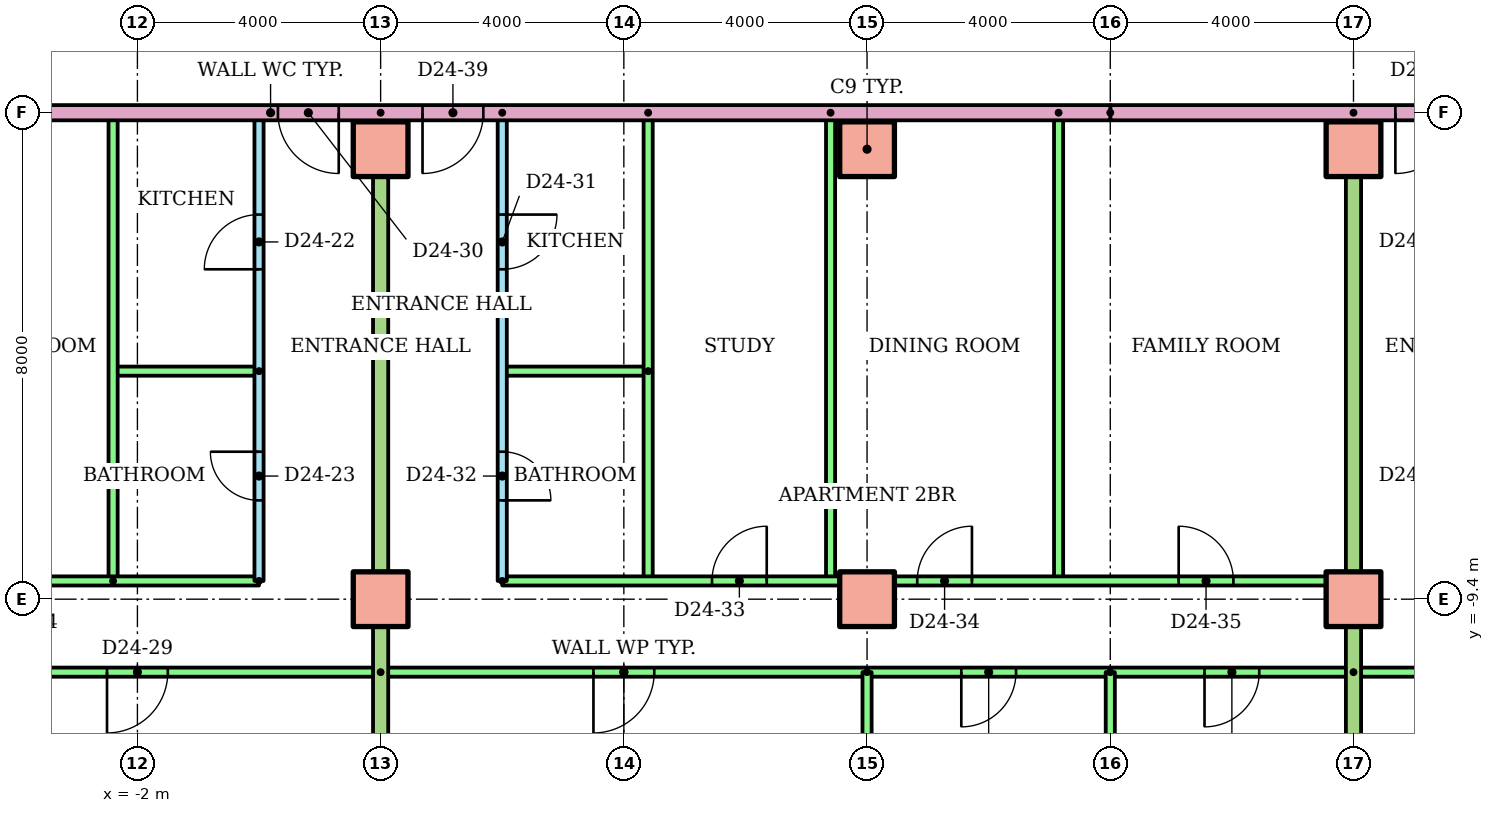
"""IFC4 building model, lengths in metres.
Left out: names, types, materials, properties, quantities, classifications, styles, units other than length and angle.
Written with IfcOpenShell. Run it as: python <this file> out.ifc"""

import sys

from ifc_helpers import new_model, si_unit, direction, frame, frame_2d, origin, origin_2d, place, context, subcontext, project, spatial, rectangle, extrude, element, fill, save


model = new_model("IFC4")
c1 = context("Model", 3, precision=1e-05, world=origin(), true_north=direction((0.0, 1.0)))
c2 = subcontext(c1, "Body", "Model", "MODEL_VIEW")
j1 = project(units=[si_unit("LENGTHUNIT", "METRE"), si_unit("PLANEANGLEUNIT", "RADIAN")], contexts=[c1])
p1 = place(None, origin())
s1 = spatial("IfcSite", under=j1, at=p1, CompositionType="ELEMENT")
p2 = place(p1, origin())
s2 = spatial("IfcBuilding", under=s1, at=p2, CompositionType="ELEMENT")
p3 = place(p2, frame((0.0, 0.0, 93.5)))
s3 = spatial("IfcBuildingStorey", under=s2, at=p3, CompositionType="ELEMENT", Elevation=93.5)
for number, where in (
    (1, (2.0, -9.4, 0.0)),
    (2, (10.0, -9.4, 0.0)),
    (3, (18.0, -9.4, 0.0)),
    (4, (2.0, -2.0, 0.0)),
    (5, (10.0, -2.0, 0.0)),
    (6, (18.0, -2.0, 0.0)),
):
    element("IfcColumn", number, at=place(p3, frame(where)), inside=s3, PredefinedType="COLUMN", context=c2, shape_type="SweptSolid", body=[
        extrude(rectangle(XDim=0.9, YDim=0.9, at=origin_2d()), origin(), (0.0, 0.0, 1.0), 3.2),
    ])
p4 = place(p3, frame((0.0, -9.1, 0.0), z_axis=(0.0, 0.0, 1.0), x_axis=(0.0, 1.0, 0.0)))
e7 = element("IfcWall", 7, at=p4, inside=s3, PredefinedType="PARTITIONING", context=c2, shape_type="SweptSolid", body=[
    extrude(rectangle(XDim=7.7, YDim=0.15, at=frame_2d((3.85, 0.0))), origin(), (0.0, 0.0, 1.0), 2.4),
])
p5 = place(p4, frame((5.125, 0.0, 0.0)))
e8 = element("IfcOpeningElement", 8, at=p5, cuts=e7, PredefinedType="OPENING", context=c2, shape_type="SweptSolid", body=[
    extrude(rectangle(XDim=0.9, YDim=2.1, at=frame_2d((0.45, 1.05))), frame((0.0, 0.085, 0.0), z_axis=(0.0, -1.0, 0.0), x_axis=(1.0, 0.0, 0.0)), (0.0, 0.0, 1.0), 0.17),
])
p6 = place(p4, frame((1.325, 0.0, 0.0)))
e9 = element("IfcOpeningElement", 9, at=p6, cuts=e7, PredefinedType="OPENING", context=c2, shape_type="SweptSolid", body=[
    extrude(rectangle(XDim=0.8, YDim=2.1, at=frame_2d((0.4, 1.05))), frame((0.0, 0.085, 0.0), z_axis=(0.0, -1.0, 0.0), x_axis=(1.0, 0.0, 0.0)), (0.0, 0.0, 1.0), 0.17),
])
p7 = place(p3, frame((0.0, -5.65, 0.0), z_axis=(0.0, 0.0, 1.0), x_axis=(-1.0, 0.0, 0.0)))
e10 = element("IfcWall", 10, at=p7, inside=s3, PredefinedType="PARTITIONING", context=c2, shape_type="SweptSolid", body=[
    extrude(rectangle(XDim=2.4, YDim=0.15, at=frame_2d((1.2, 0.0))), origin(), (0.0, 0.0, 1.0), 2.4),
])
p8 = place(p3, frame((-2.4, -9.1, 0.0), z_axis=(0.0, 0.0, 1.0), x_axis=(0.0, 1.0, 0.0)))
e11 = element("IfcWall", 11, at=p8, inside=s3, PredefinedType="PARTITIONING", context=c2, shape_type="SweptSolid", body=[
    extrude(rectangle(XDim=7.7, YDim=0.15, at=frame_2d((3.85, 0.0))), origin(), (0.0, 0.0, 1.0), 2.4),
])
p9 = place(p3, frame((-14.0, -9.1, 0.0)))
e12 = element("IfcWall", 12, at=p9, inside=s3, PredefinedType="PARTITIONING", context=c2, shape_type="SweptSolid", body=[
    extrude(rectangle(XDim=14.0, YDim=0.15, at=frame_2d((7.0, 0.0))), origin(), (0.0, 0.0, 1.0), 2.4),
])
p10 = place(p9, frame((9.65, 0.0, 0.0)))
e13 = element("IfcOpeningElement", 13, at=p10, cuts=e12, PredefinedType="OPENING", context=c2, shape_type="SweptSolid", body=[
    extrude(rectangle(XDim=0.9, YDim=2.1, at=frame_2d((0.45, 1.05))), frame((0.0, 0.085, 0.0), z_axis=(0.0, -1.0, 0.0), x_axis=(1.0, 0.0, 0.0)), (0.0, 0.0, 1.0), 0.17),
])
p11 = place(p9, frame((6.275, 0.0, 0.0)))
e14 = element("IfcOpeningElement", 14, at=p11, cuts=e12, PredefinedType="OPENING", context=c2, shape_type="SweptSolid", body=[
    extrude(rectangle(XDim=0.9, YDim=2.1, at=frame_2d((0.45, 1.05))), frame((0.0, 0.085, 0.0), z_axis=(0.0, -1.0, 0.0), x_axis=(1.0, 0.0, 0.0)), (0.0, 0.0, 1.0), 0.17),
])
p12 = place(p9, frame((1.975, 0.0, 0.0)))
e15 = element("IfcOpeningElement", 15, at=p12, cuts=e12, PredefinedType="OPENING", context=c2, shape_type="SweptSolid", body=[
    extrude(rectangle(XDim=0.9, YDim=2.1, at=frame_2d((0.45, 1.05))), frame((0.0, 0.085, 0.0), z_axis=(0.0, -1.0, 0.0), x_axis=(1.0, 0.0, 0.0)), (0.0, 0.0, 1.0), 0.17),
])
p13 = place(p3, frame((2.0, -10.6, 0.0), z_axis=(0.0, 0.0, 1.0), x_axis=(-1.0, 0.0, 0.0)))
e16 = element("IfcWall", 16, at=p13, inside=s3, PredefinedType="PARTITIONING", context=c2, shape_type="SweptSolid", body=[
    extrude(rectangle(XDim=16.0, YDim=0.15, at=frame_2d((8.0, 0.0))), origin(), (0.0, 0.0, 1.0), 2.4),
])
p14 = place(p13, frame((13.55, 0.0, 0.0)))
e17 = element("IfcOpeningElement", 17, at=p14, cuts=e16, PredefinedType="OPENING", context=c2, shape_type="SweptSolid", body=[
    extrude(rectangle(XDim=0.9, YDim=2.1, at=frame_2d((0.45, 1.05))), frame((0.0, 0.085, 0.0), z_axis=(0.0, -1.0, 0.0), x_axis=(1.0, 0.0, 0.0)), (0.0, 0.0, 1.0), 0.17),
])
p15 = place(p13, frame((9.55, 0.0, 0.0)))
e18 = element("IfcOpeningElement", 18, at=p15, cuts=e16, PredefinedType="OPENING", context=c2, shape_type="SweptSolid", body=[
    extrude(rectangle(XDim=0.9, YDim=2.1, at=frame_2d((0.45, 1.05))), frame((0.0, 0.085, 0.0), z_axis=(0.0, -1.0, 0.0), x_axis=(1.0, 0.0, 0.0)), (0.0, 0.0, 1.0), 0.17),
])
p16 = place(p13, frame((3.5, 0.0, 0.0)))
e19 = element("IfcOpeningElement", 19, at=p16, cuts=e16, PredefinedType="OPENING", context=c2, shape_type="SweptSolid", body=[
    extrude(rectangle(XDim=1.0, YDim=2.1, at=frame_2d((0.5, 1.05))), frame((0.0, 0.085, 0.0), z_axis=(0.0, -1.0, 0.0), x_axis=(1.0, 0.0, 0.0)), (0.0, 0.0, 1.0), 0.17),
])
p17 = place(p3, frame((4.0, -1.4, 0.0), z_axis=(0.0, 0.0, 1.0), x_axis=(0.0, -1.0, 0.0)))
e20 = element("IfcWall", 20, at=p17, inside=s3, PredefinedType="PARTITIONING", context=c2, shape_type="SweptSolid", body=[
    extrude(rectangle(XDim=7.7, YDim=0.15, at=frame_2d((3.85, 0.0))), origin(), (0.0, 0.0, 1.0), 2.4),
])
p18 = place(p17, frame((1.675, 0.0, 0.0)))
e21 = element("IfcOpeningElement", 21, at=p18, cuts=e20, PredefinedType="OPENING", context=c2, shape_type="SweptSolid", body=[
    extrude(rectangle(XDim=0.9, YDim=2.1, at=frame_2d((0.45, 1.05))), frame((0.0, 0.085, 0.0), z_axis=(0.0, -1.0, 0.0), x_axis=(1.0, 0.0, 0.0)), (0.0, 0.0, 1.0), 0.17),
])
p19 = place(p17, frame((5.575, 0.0, 0.0)))
e22 = element("IfcOpeningElement", 22, at=p19, cuts=e20, PredefinedType="OPENING", context=c2, shape_type="SweptSolid", body=[
    extrude(rectangle(XDim=0.8, YDim=2.1, at=frame_2d((0.4, 1.05))), frame((0.0, 0.085, 0.0), z_axis=(0.0, -1.0, 0.0), x_axis=(1.0, 0.0, 0.0)), (0.0, 0.0, 1.0), 0.17),
])
p20 = place(p3, frame((6.4, -5.65, 0.0), z_axis=(0.0, 0.0, 1.0), x_axis=(-1.0, 0.0, 0.0)))
e23 = element("IfcWall", 23, at=p20, inside=s3, PredefinedType="PARTITIONING", context=c2, shape_type="SweptSolid", body=[
    extrude(rectangle(XDim=2.4, YDim=0.15, at=frame_2d((1.2, 0.0))), origin(), (0.0, 0.0, 1.0), 2.4),
])
for number, where, z_axis, x_axis in (
    (24, (6.4, -1.4, 0.0), (0.0, 0.0, 1.0), (0.0, -1.0, 0.0)),
    (25, (9.4, -1.4, 0.0), (0.0, 0.0, 1.0), (0.0, -1.0, 0.0)),
    (26, (13.15, -1.4, 0.0), (0.0, 0.0, 1.0), (0.0, -1.0, 0.0)),
):
    element("IfcWall", number, at=place(p3, frame(where, z_axis=z_axis, x_axis=x_axis)), inside=s3, PredefinedType="PARTITIONING", context=c2, shape_type="SweptSolid", body=[
        extrude(rectangle(XDim=7.7, YDim=0.15, at=frame_2d((3.85, 0.0))), origin(), (0.0, 0.0, 1.0), 2.4),
    ])
p21 = place(p3, frame((4.0, -9.1, 0.0)))
e27 = element("IfcWall", 27, at=p21, inside=s3, PredefinedType="PARTITIONING", context=c2, shape_type="SweptSolid", body=[
    extrude(rectangle(XDim=14.0, YDim=0.15, at=frame_2d((7.0, 0.0))), origin(), (0.0, 0.0, 1.0), 2.4),
])
p22 = place(p21, frame((3.45, 0.0, 0.0)))
e28 = element("IfcOpeningElement", 28, at=p22, cuts=e27, PredefinedType="OPENING", context=c2, shape_type="SweptSolid", body=[
    extrude(rectangle(XDim=0.9, YDim=2.1, at=frame_2d((0.45, 1.05))), frame((0.0, 0.085, 0.0), z_axis=(0.0, -1.0, 0.0), x_axis=(1.0, 0.0, 0.0)), (0.0, 0.0, 1.0), 0.17),
])
p23 = place(p21, frame((6.825, 0.0, 0.0)))
e29 = element("IfcOpeningElement", 29, at=p23, cuts=e27, PredefinedType="OPENING", context=c2, shape_type="SweptSolid", body=[
    extrude(rectangle(XDim=0.9, YDim=2.1, at=frame_2d((0.45, 1.05))), frame((0.0, 0.085, 0.0), z_axis=(0.0, -1.0, 0.0), x_axis=(1.0, 0.0, 0.0)), (0.0, 0.0, 1.0), 0.17),
])
p24 = place(p21, frame((11.125, 0.0, 0.0)))
e30 = element("IfcOpeningElement", 30, at=p24, cuts=e27, PredefinedType="OPENING", context=c2, shape_type="SweptSolid", body=[
    extrude(rectangle(XDim=0.9, YDim=2.1, at=frame_2d((0.45, 1.05))), frame((0.0, 0.085, 0.0), z_axis=(0.0, -1.0, 0.0), x_axis=(1.0, 0.0, 0.0)), (0.0, 0.0, 1.0), 0.17),
])
p25 = place(p3, frame((18.0, -10.6, 0.0), z_axis=(0.0, 0.0, 1.0), x_axis=(-1.0, 0.0, 0.0)))
e31 = element("IfcWall", 31, at=p25, inside=s3, PredefinedType="PARTITIONING", context=c2, shape_type="SweptSolid", body=[
    extrude(rectangle(XDim=16.0, YDim=0.15, at=frame_2d((8.0, 0.0))), origin(), (0.0, 0.0, 1.0), 2.4),
])
p26 = place(p25, frame((11.5, 0.0, 0.0)))
e32 = element("IfcOpeningElement", 32, at=p26, cuts=e31, PredefinedType="OPENING", context=c2, shape_type="SweptSolid", body=[
    extrude(rectangle(XDim=1.0, YDim=2.1, at=frame_2d((0.5, 1.05))), frame((0.0, 0.085, 0.0), z_axis=(0.0, -1.0, 0.0), x_axis=(1.0, 0.0, 0.0)), (0.0, 0.0, 1.0), 0.17),
])
p27 = place(p25, frame((5.55, 0.0, 0.0)))
e33 = element("IfcOpeningElement", 33, at=p27, cuts=e31, PredefinedType="OPENING", context=c2, shape_type="SweptSolid", body=[
    extrude(rectangle(XDim=0.9, YDim=2.1, at=frame_2d((0.45, 1.05))), frame((0.0, 0.085, 0.0), z_axis=(0.0, -1.0, 0.0), x_axis=(1.0, 0.0, 0.0)), (0.0, 0.0, 1.0), 0.17),
])
p28 = place(p25, frame((1.55, 0.0, 0.0)))
e34 = element("IfcOpeningElement", 34, at=p28, cuts=e31, PredefinedType="OPENING", context=c2, shape_type="SweptSolid", body=[
    extrude(rectangle(XDim=0.9, YDim=2.1, at=frame_2d((0.45, 1.05))), frame((0.0, 0.085, 0.0), z_axis=(0.0, -1.0, 0.0), x_axis=(1.0, 0.0, 0.0)), (0.0, 0.0, 1.0), 0.17),
])
p29 = place(p3, frame((10.0, -10.6, 0.0), z_axis=(0.0, 0.0, 1.0), x_axis=(0.0, -1.0, 0.0)))
e35 = element("IfcWall", 35, at=p29, inside=s3, PredefinedType="PARTITIONING", context=c2, shape_type="SweptSolid", body=[
    extrude(rectangle(XDim=5.61, YDim=0.15, at=frame_2d((2.805, 0.0))), origin(), (0.0, 0.0, 1.0), 2.4),
])
p30 = place(p3, frame((14.0, -10.6, 0.0), z_axis=(0.0, 0.0, 1.0), x_axis=(0.0, -1.0, 0.0)))
e36 = element("IfcWall", 36, at=p30, inside=s3, PredefinedType="PARTITIONING", context=c2, shape_type="SweptSolid", body=[
    extrude(rectangle(XDim=5.621, YDim=0.15, at=frame_2d((2.811, 0.0))), origin(), (0.0, 0.0, 1.0), 2.4),
])
p31 = place(p3, frame((2.0, -1.4, 0.0), z_axis=(0.0, 0.0, 1.0), x_axis=(0.0, -1.0, 0.0)))
e37 = element("IfcWall", 37, at=p31, inside=s3, PredefinedType="PARTITIONING", context=c2, shape_type="SweptSolid", body=[
    extrude(rectangle(XDim=14.81, YDim=0.25, at=frame_2d((7.405, 0.0))), origin(), (0.0, 0.0, 1.0), 2.4),
])
p32 = place(p3, frame((40.62, -10.6, 0.0), z_axis=(0.0, 0.0, 1.0), x_axis=(-1.0, 0.0, 0.0)))
e38 = element("IfcWall", 38, at=p32, inside=s3, PredefinedType="PARTITIONING", context=c2, shape_type="SweptSolid", body=[
    extrude(rectangle(XDim=22.62, YDim=0.15, at=frame_2d((11.31, 0.0))), origin(), (0.0, 0.0, 1.0), 2.4),
])
p33 = place(p32, frame((20.17, 0.0, 0.0)))
e39 = element("IfcOpeningElement", 39, at=p33, cuts=e38, PredefinedType="OPENING", context=c2, shape_type="SweptSolid", body=[
    extrude(rectangle(XDim=0.9, YDim=2.1, at=frame_2d((0.45, 1.05))), frame((0.0, 0.085, 0.0), z_axis=(0.0, -1.0, 0.0), x_axis=(1.0, 0.0, 0.0)), (0.0, 0.0, 1.0), 0.17),
])
p34 = place(p32, frame((16.12, 0.0, 0.0)))
e40 = element("IfcOpeningElement", 40, at=p34, cuts=e38, PredefinedType="OPENING", context=c2, shape_type="SweptSolid", body=[
    extrude(rectangle(XDim=1.0, YDim=2.1, at=frame_2d((0.5, 1.05))), frame((0.0, 0.085, 0.0), z_axis=(0.0, -1.0, 0.0), x_axis=(1.0, 0.0, 0.0)), (0.0, 0.0, 1.0), 0.17),
])
p35 = place(p32, frame((12.17, 0.0, 0.0)))
e41 = element("IfcOpeningElement", 41, at=p35, cuts=e38, PredefinedType="OPENING", context=c2, shape_type="SweptSolid", body=[
    extrude(rectangle(XDim=0.9, YDim=2.1, at=frame_2d((0.45, 1.05))), frame((0.0, 0.085, 0.0), z_axis=(0.0, -1.0, 0.0), x_axis=(1.0, 0.0, 0.0)), (0.0, 0.0, 1.0), 0.17),
])
p36 = place(p32, frame((8.17, 0.0, 0.0)))
e42 = element("IfcOpeningElement", 42, at=p36, cuts=e38, PredefinedType="OPENING", context=c2, shape_type="SweptSolid", body=[
    extrude(rectangle(XDim=0.9, YDim=2.1, at=frame_2d((0.45, 1.05))), frame((0.0, 0.085, 0.0), z_axis=(0.0, -1.0, 0.0), x_axis=(1.0, 0.0, 0.0)), (0.0, 0.0, 1.0), 0.17),
])
p37 = place(p32, frame((2.97, 0.0, 0.0)))
e43 = element("IfcOpeningElement", 43, at=p37, cuts=e38, PredefinedType="OPENING", context=c2, shape_type="SweptSolid", body=[
    extrude(rectangle(XDim=0.9, YDim=2.1, at=frame_2d((0.45, 1.05))), frame((0.0, 0.085, 0.0), z_axis=(0.0, -1.0, 0.0), x_axis=(1.0, 0.0, 0.0)), (0.0, 0.0, 1.0), 0.17),
])
p38 = place(p3, frame((18.0, -1.4, 0.0), z_axis=(0.0, 0.0, 1.0), x_axis=(0.0, -1.0, 0.0)))
e44 = element("IfcWall", 44, at=p38, inside=s3, PredefinedType="PARTITIONING", context=c2, shape_type="SweptSolid", body=[
    extrude(rectangle(XDim=14.81, YDim=0.25, at=frame_2d((7.405, 0.0))), origin(), (0.0, 0.0, 1.0), 2.4),
])
p39 = place(p3, frame((29.0, -1.4, 0.0), z_axis=(0.0, 0.0, 1.0), x_axis=(-1.0, 0.0, 0.0)))
e45 = element("IfcWall", 45, at=p39, inside=s3, PredefinedType="PARTITIONING", context=c2, shape_type="SweptSolid", body=[
    extrude(rectangle(XDim=15.0, YDim=0.25, at=frame_2d((7.5, 0.0))), origin(), (0.0, 0.0, 1.0), 2.4),
])
p40 = place(p39, frame((9.311, 0.0, 0.0)))
e46 = element("IfcOpeningElement", 46, at=p40, cuts=e45, PredefinedType="OPENING", context=c2, shape_type="SweptSolid", body=[
    extrude(rectangle(XDim=1.0, YDim=2.1, at=frame_2d((0.5, 1.05))), frame((0.0, 0.135, 0.0), z_axis=(0.0, -1.0, 0.0), x_axis=(1.0, 0.0, 0.0)), (0.0, 0.0, 1.0), 0.27),
])
p41 = place(p3, frame((14.0, -1.4, 0.0), z_axis=(0.0, 0.0, 1.0), x_axis=(-1.0, 0.0, 0.0)))
e47 = element("IfcWall", 47, at=p41, inside=s3, PredefinedType="PARTITIONING", context=c2, shape_type="SweptSolid", body=[
    extrude(rectangle(XDim=28.0, YDim=0.25, at=frame_2d((14.0, 0.0))), origin(), (0.0, 0.0, 1.0), 2.4),
])
p42 = place(p41, frame((12.689, 0.0, 0.0)))
e48 = element("IfcOpeningElement", 48, at=p42, cuts=e47, PredefinedType="OPENING", context=c2, shape_type="SweptSolid", body=[
    extrude(rectangle(XDim=1.0, YDim=2.1, at=frame_2d((0.5, 1.05))), frame((0.0, 0.135, 0.0), z_axis=(0.0, -1.0, 0.0), x_axis=(1.0, 0.0, 0.0)), (0.0, 0.0, 1.0), 0.27),
])
p43 = place(p41, frame((10.311, 0.0, 0.0)))
e49 = element("IfcOpeningElement", 49, at=p43, cuts=e47, PredefinedType="OPENING", context=c2, shape_type="SweptSolid", body=[
    extrude(rectangle(XDim=1.0, YDim=2.1, at=frame_2d((0.5, 1.05))), frame((0.0, 0.135, 0.0), z_axis=(0.0, -1.0, 0.0), x_axis=(1.0, 0.0, 0.0)), (0.0, 0.0, 1.0), 0.27),
])
p44 = place(p5, origin())
e50 = element("IfcDoor", 50, at=p44, inside=s3, OperationType="SINGLE_SWING_LEFT", PredefinedType="DOOR", context=c2, shape_type="SweptSolid", body=[
    extrude(rectangle(XDim=0.9, YDim=2.1, at=frame_2d((0.45, 1.05))), frame((0.0, 0.025, 0.0), z_axis=(0.0, -1.0, 0.0), x_axis=(1.0, 0.0, 0.0)), (0.0, 0.0, 1.0), 0.05),
])
fill(e8, e50)
p45 = place(p6, origin())
e51 = element("IfcDoor", 51, at=p45, inside=s3, OperationType="SINGLE_SWING_RIGHT", PredefinedType="DOOR", context=c2, shape_type="SweptSolid", body=[
    extrude(rectangle(XDim=0.8, YDim=2.1, at=frame_2d((0.4, 1.05))), frame((0.0, 0.025, 0.0), z_axis=(0.0, -1.0, 0.0), x_axis=(1.0, 0.0, 0.0)), (0.0, 0.0, 1.0), 0.05),
])
fill(e9, e51)
p46 = place(p16, origin())
e52 = element("IfcDoor", 52, at=p46, inside=s3, OperationType="SINGLE_SWING_RIGHT", PredefinedType="DOOR", context=c2, shape_type="SweptSolid", body=[
    extrude(rectangle(XDim=1.0, YDim=2.1, at=frame_2d((0.5, 1.05))), frame((0.0, 0.025, 0.0), z_axis=(0.0, -1.0, 0.0), x_axis=(1.0, 0.0, 0.0)), (0.0, 0.0, 1.0), 0.05),
])
fill(e19, e52)
p47 = place(p42, origin())
e53 = element("IfcDoor", 53, at=p47, inside=s3, OperationType="SINGLE_SWING_LEFT", PredefinedType="DOOR", context=c2, shape_type="SweptSolid", body=[
    extrude(rectangle(XDim=1.0, YDim=2.1, at=frame_2d((0.5, 1.05))), frame((0.0, 0.025, 0.0), z_axis=(0.0, -1.0, 0.0), x_axis=(1.0, 0.0, 0.0)), (0.0, 0.0, 1.0), 0.05),
])
fill(e48, e53)
p48 = place(p18, origin())
e54 = element("IfcDoor", 54, at=p48, inside=s3, OperationType="SINGLE_SWING_LEFT", PredefinedType="DOOR", context=c2, shape_type="SweptSolid", body=[
    extrude(rectangle(XDim=0.9, YDim=2.1, at=frame_2d((0.45, 1.05))), frame((0.0, 0.025, 0.0), z_axis=(0.0, -1.0, 0.0), x_axis=(1.0, 0.0, 0.0)), (0.0, 0.0, 1.0), 0.05),
])
fill(e21, e54)
p49 = place(p19, origin())
e55 = element("IfcDoor", 55, at=p49, inside=s3, OperationType="SINGLE_SWING_RIGHT", PredefinedType="DOOR", context=c2, shape_type="SweptSolid", body=[
    extrude(rectangle(XDim=0.8, YDim=2.1, at=frame_2d((0.4, 1.05))), frame((0.0, 0.025, 0.0), z_axis=(0.0, -1.0, 0.0), x_axis=(1.0, 0.0, 0.0)), (0.0, 0.0, 1.0), 0.05),
])
fill(e22, e55)
p50 = place(p22, origin())
e56 = element("IfcDoor", 56, at=p50, inside=s3, OperationType="SINGLE_SWING_RIGHT", PredefinedType="DOOR", context=c2, shape_type="SweptSolid", body=[
    extrude(rectangle(XDim=0.9, YDim=2.1, at=frame_2d((0.45, 1.05))), frame((0.0, 0.025, 0.0), z_axis=(0.0, -1.0, 0.0), x_axis=(1.0, 0.0, 0.0)), (0.0, 0.0, 1.0), 0.05),
])
fill(e28, e56)
p51 = place(p23, origin())
e57 = element("IfcDoor", 57, at=p51, inside=s3, OperationType="SINGLE_SWING_RIGHT", PredefinedType="DOOR", context=c2, shape_type="SweptSolid", body=[
    extrude(rectangle(XDim=0.9, YDim=2.1, at=frame_2d((0.45, 1.05))), frame((0.0, 0.025, 0.0), z_axis=(0.0, -1.0, 0.0), x_axis=(1.0, 0.0, 0.0)), (0.0, 0.0, 1.0), 0.05),
])
fill(e29, e57)
p52 = place(p24, origin())
e58 = element("IfcDoor", 58, at=p52, inside=s3, OperationType="SINGLE_SWING_LEFT", PredefinedType="DOOR", context=c2, shape_type="SweptSolid", body=[
    extrude(rectangle(XDim=0.9, YDim=2.1, at=frame_2d((0.45, 1.05))), frame((0.0, 0.025, 0.0), z_axis=(0.0, -1.0, 0.0), x_axis=(1.0, 0.0, 0.0)), (0.0, 0.0, 1.0), 0.05),
])
fill(e30, e58)
p53 = place(p26, origin())
e59 = element("IfcDoor", 59, at=p53, inside=s3, OperationType="SINGLE_SWING_RIGHT", PredefinedType="DOOR", context=c2, shape_type="SweptSolid", body=[
    extrude(rectangle(XDim=1.0, YDim=2.1, at=frame_2d((0.5, 1.05))), frame((0.0, 0.025, 0.0), z_axis=(0.0, -1.0, 0.0), x_axis=(1.0, 0.0, 0.0)), (0.0, 0.0, 1.0), 0.05),
])
fill(e32, e59)
p54 = place(p27, origin())
e60 = element("IfcDoor", 60, at=p54, inside=s3, OperationType="SINGLE_SWING_RIGHT", PredefinedType="DOOR", context=c2, shape_type="SweptSolid", body=[
    extrude(rectangle(XDim=0.9, YDim=2.1, at=frame_2d((0.45, 1.05))), frame((0.0, 0.025, 0.0), z_axis=(0.0, -1.0, 0.0), x_axis=(1.0, 0.0, 0.0)), (0.0, 0.0, 1.0), 0.05),
])
fill(e33, e60)
p55 = place(p28, origin())
e61 = element("IfcDoor", 61, at=p55, inside=s3, OperationType="SINGLE_SWING_RIGHT", PredefinedType="DOOR", context=c2, shape_type="SweptSolid", body=[
    extrude(rectangle(XDim=0.9, YDim=2.1, at=frame_2d((0.45, 1.05))), frame((0.0, 0.025, 0.0), z_axis=(0.0, -1.0, 0.0), x_axis=(1.0, 0.0, 0.0)), (0.0, 0.0, 1.0), 0.05),
])
fill(e34, e61)
p56 = place(p43, origin())
e62 = element("IfcDoor", 62, at=p56, inside=s3, OperationType="SINGLE_SWING_RIGHT", PredefinedType="DOOR", context=c2, shape_type="SweptSolid", body=[
    extrude(rectangle(XDim=1.0, YDim=2.1, at=frame_2d((0.5, 1.05))), frame((0.0, 0.025, 0.0), z_axis=(0.0, -1.0, 0.0), x_axis=(1.0, 0.0, 0.0)), (0.0, 0.0, 1.0), 0.05),
])
fill(e49, e62)
p57 = place(p40, origin())
e63 = element("IfcDoor", 63, at=p57, inside=s3, OperationType="SINGLE_SWING_RIGHT", PredefinedType="DOOR", context=c2, shape_type="SweptSolid", body=[
    extrude(rectangle(XDim=1.0, YDim=2.1, at=frame_2d((0.5, 1.05))), frame((0.0, 0.025, 0.0), z_axis=(0.0, -1.0, 0.0), x_axis=(1.0, 0.0, 0.0)), (0.0, 0.0, 1.0), 0.05),
])
fill(e46, e63)
save(model, sys.argv[1])
